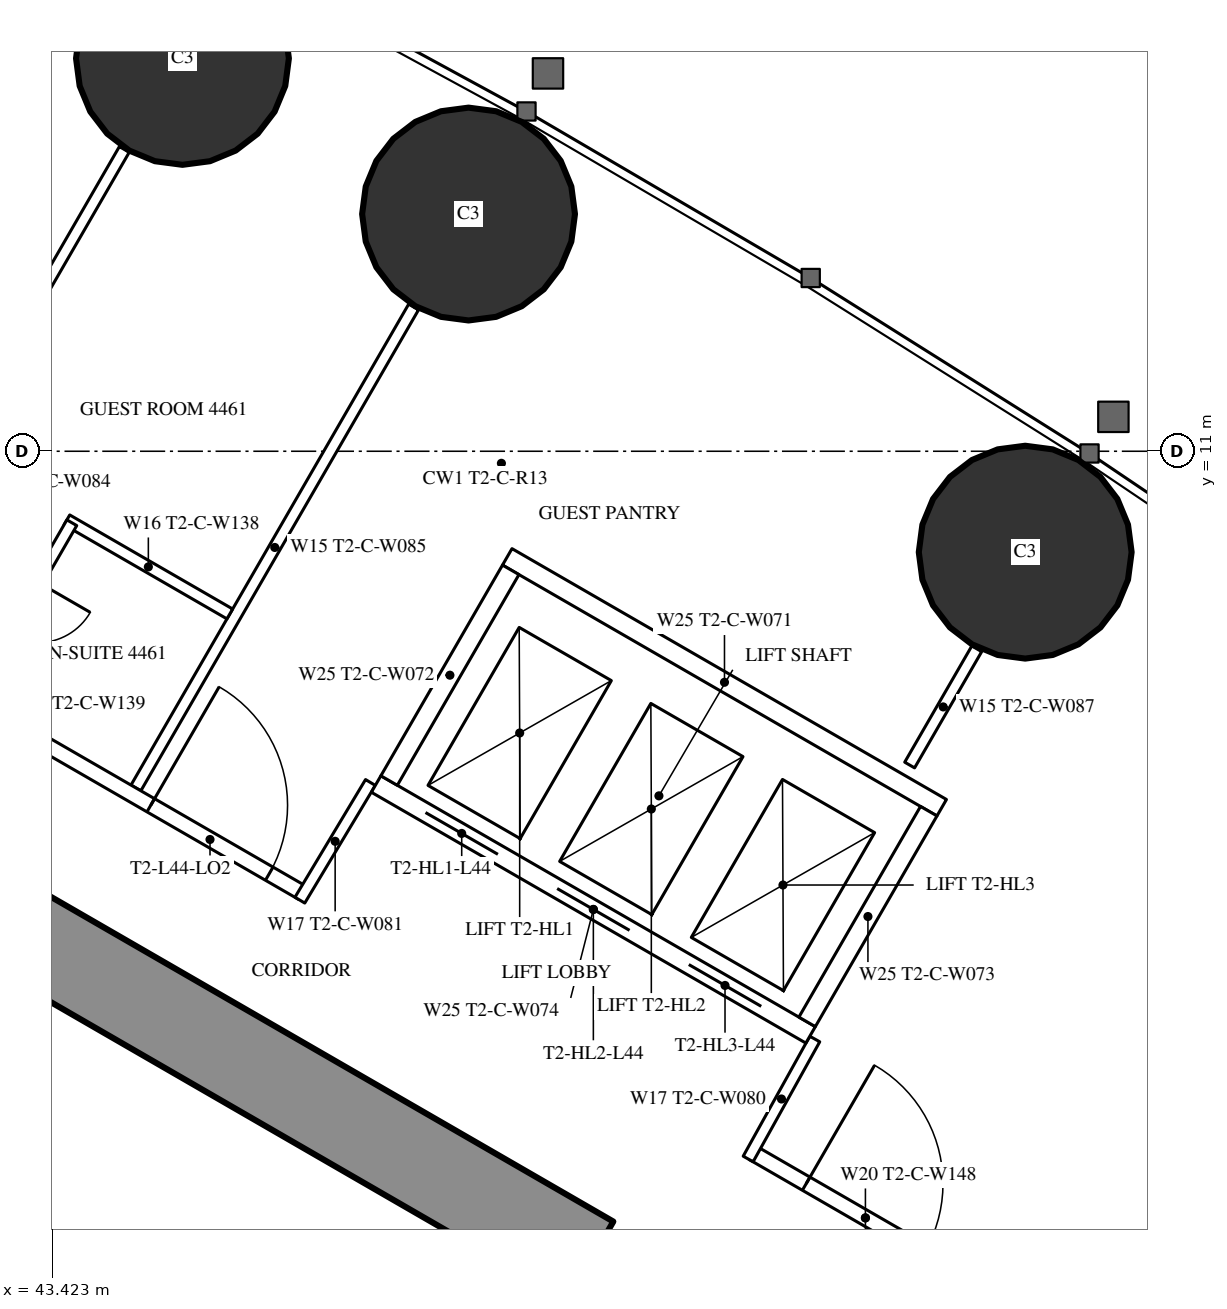
"""IFC4 building model, lengths in metres.
Left out: names, types, materials, properties, quantities, classifications, styles, units other than length and angle.
Written with IfcOpenShell. Run it as: python <this file> out.ifc"""

import sys

from ifc_helpers import new_model, si_unit, direction, frame, frame_2d, origin, origin_2d, place, context, subcontext, project, spatial, rectangle, circle, extrude, element, fill, save


model = new_model("IFC4")
c1 = context("Model", 3, precision=1e-05, world=origin(), true_north=direction((0.0, 1.0)))
c2 = subcontext(c1, "Body", "Model", "MODEL_VIEW")
j1 = project(units=[si_unit("LENGTHUNIT", "METRE"), si_unit("PLANEANGLEUNIT", "RADIAN")], contexts=[c1])
p1 = place(None, origin())
s1 = spatial("IfcSite", under=j1, at=p1, CompositionType="ELEMENT")
p2 = place(p1, origin())
s2 = spatial("IfcBuilding", under=s1, at=p2, CompositionType="ELEMENT")
p3 = place(p2, frame((0.0, 0.0, 166.8)))
s3 = spatial("IfcBuildingStorey", under=s2, at=p3, CompositionType="ELEMENT", Elevation=166.8)
for number, where, z_axis, x_axis in (
    (1, (56.221, 9.672, 0.0), (0.0, 0.0, 1.0), (1.0, 0.0, 0.0)),
    (2, (48.897, 14.121, 0.0), (0.0, 0.0, 1.0), (1.0, 0.0, 0.0)),
    (3, (45.134, 16.168, 0.0), (0.0, 0.0, 1.0), (1.0, 0.0, 0.0)),
):
    element("IfcColumn", number, at=place(p3, frame(where, z_axis=z_axis, x_axis=x_axis)), inside=s3, PredefinedType="COLUMN", context=c2, shape_type="SweptSolid", body=[
        extrude(circle(Radius=1.4, at=origin_2d()), origin(), (0.0, 0.0, 1.0), 3.5),
    ])
p4 = place(p3, frame((27.2, 13.8, 0.0), z_axis=(0.0, 0.0, 1.0), x_axis=(0.866024515034, -0.500001539357, 0.0)))
e4 = element("IfcWall", 4, at=p4, inside=s3, PredefinedType="SHEAR", context=c2, shape_type="SweptSolid", body=[
    extrude(rectangle(XDim=26.907, YDim=1.2, at=frame_2d((13.454, 0.0))), origin(), (0.0, 0.0, 1.0), 3.5),
])
p5 = place(p4, frame((4.6, 0.0, 0.0)))
e5 = element("IfcOpeningElement", 5, at=p5, cuts=e4, PredefinedType="OPENING", context=c2, shape_type="SweptSolid", body=[
    extrude(rectangle(XDim=1.0, YDim=2.2, at=frame_2d((0.5, 1.1))), frame((0.0, 0.61, 0.0), z_axis=(0.0, -1.0, 0.0), x_axis=(1.0, 0.0, 0.0)), (0.0, 0.0, 1.0), 1.22),
])
p6 = place(p4, frame((13.395, 0.0, 0.0)))
e6 = element("IfcOpeningElement", 6, at=p6, cuts=e4, PredefinedType="OPENING", context=c2, shape_type="SweptSolid", body=[
    extrude(rectangle(XDim=1.8, YDim=2.2, at=frame_2d((0.9, 1.1))), frame((0.0, 0.61, 0.0), z_axis=(0.0, -1.0, 0.0), x_axis=(1.0, 0.0, 0.0)), (0.0, 0.0, 1.0), 1.22),
])
p7 = place(p3, frame((40.769, 8.737, 0.0), z_axis=(0.0, 0.0, 1.0), x_axis=(0.500013115284, 0.866017831539, 0.0)))
e7 = element("IfcWall", 7, at=p7, inside=s3, PredefinedType="PARTITIONING", context=c2, shape_type="SweptSolid", body=[
    extrude(rectangle(XDim=7.198, YDim=0.15, at=frame_2d((3.599, 0.0))), origin(), (0.0, 0.0, 1.0), 2.3),
])
p8 = place(p3, frame((44.521, 6.571, 0.0), z_axis=(0.0, 0.0, 1.0), x_axis=(0.500020376429, 0.866013639128, 0.0)))
e8 = element("IfcWall", 8, at=p8, inside=s3, PredefinedType="PARTITIONING", context=c2, shape_type="SweptSolid", body=[
    extrude(rectangle(XDim=7.306, YDim=0.15, at=frame_2d((3.653, 0.0))), origin(), (0.0, 0.0, 1.0), 2.3),
])
p9 = place(p3, frame((54.7, 6.872, 0.0), z_axis=(0.0, 0.0, 1.0), x_axis=(0.499989690894, 0.866031355668, 0.0)))
e9 = element("IfcWall", 9, at=p9, inside=s3, PredefinedType="PARTITIONING", context=c2, shape_type="SweptSolid", body=[
    extrude(rectangle(XDim=1.766, YDim=0.15, at=frame_2d((0.883, 0.0))), origin(), (0.0, 0.0, 1.0), 3.25),
])
p10 = place(p3, frame((27.959, 16.017, 0.0), z_axis=(0.0, 0.0, 1.0), x_axis=(0.866027146794, -0.499996981007, 0.0)))
e10 = element("IfcWall", 10, at=p10, inside=s3, PredefinedType="PARTITIONING", context=c2, shape_type="SweptSolid", body=[
    extrude(rectangle(XDim=21.657, YDim=0.2, at=frame_2d((10.829, 0.0))), origin(), (0.0, 0.0, 1.0), 3.25),
])
p11 = place(p10, frame((15.391, 0.0, 0.0)))
e11 = element("IfcOpeningElement", 11, at=p11, cuts=e10, PredefinedType="OPENING", context=c2, shape_type="SweptSolid", body=[
    extrude(rectangle(XDim=0.95, YDim=2.2, at=frame_2d((0.475, 1.1))), frame((0.0, 0.11, 0.0), z_axis=(0.0, -1.0, 0.0), x_axis=(1.0, 0.0, 0.0)), (0.0, 0.0, 1.0), 0.22),
])
p12 = place(p10, frame((13.409, 0.0, 0.0)))
e12 = element("IfcOpeningElement", 12, at=p12, cuts=e10, PredefinedType="OPENING", context=c2, shape_type="SweptSolid", body=[
    extrude(rectangle(XDim=0.95, YDim=2.2, at=frame_2d((0.475, 1.1))), frame((0.0, 0.11, 0.0), z_axis=(0.0, -1.0, 0.0), x_axis=(1.0, 0.0, 0.0)), (0.0, 0.0, 1.0), 0.22),
])
p13 = place(p10, frame((0.6, 0.0, 0.0)))
e13 = element("IfcOpeningElement", 13, at=p13, cuts=e10, PredefinedType="OPENING", context=c2, shape_type="SweptSolid", body=[
    extrude(rectangle(XDim=0.95, YDim=2.2, at=frame_2d((0.475, 1.1))), frame((0.0, 0.11, 0.0), z_axis=(0.0, -1.0, 0.0), x_axis=(1.0, 0.0, 0.0)), (0.0, 0.0, 1.0), 0.22),
])
p14 = place(p10, frame((19.349, 0.0, 0.0)))
e14 = element("IfcOpeningElement", 14, at=p14, cuts=e10, PredefinedType="OPENING", context=c2, shape_type="SweptSolid", body=[
    extrude(rectangle(XDim=1.8, YDim=2.2, at=frame_2d((0.9, 1.1))), frame((0.0, 0.11, 0.0), z_axis=(0.0, -1.0, 0.0), x_axis=(1.0, 0.0, 0.0)), (0.0, 0.0, 1.0), 0.22),
])
p15 = place(p3, frame((52.639, 1.769, 0.0), z_axis=(0.0, 0.0, 1.0), x_axis=(0.866027340901, -0.4999966448, 0.0)))
e15 = element("IfcWall", 15, at=p15, inside=s3, PredefinedType="PARTITIONING", context=c2, shape_type="SweptSolid", body=[
    extrude(rectangle(XDim=3.417, YDim=0.2, at=frame_2d((1.708, 0.0))), origin(), (0.0, 0.0, 1.0), 3.25),
])
p16 = place(p15, frame((0.809, 0.0, 0.0)))
e16 = element("IfcOpeningElement", 16, at=p16, cuts=e15, PredefinedType="OPENING", context=c2, shape_type="SweptSolid", body=[
    extrude(rectangle(XDim=1.8, YDim=2.2, at=frame_2d((0.9, 1.1))), frame((0.0, 0.11, 0.0), z_axis=(0.0, -1.0, 0.0), x_axis=(1.0, 0.0, 0.0)), (0.0, 0.0, 1.0), 0.22),
])
p17 = place(p3, frame((52.576, 1.689, 0.0), z_axis=(0.0, 0.0, 1.0), x_axis=(0.485424724123, 0.874278466629, 0.0)))
e17 = element("IfcWall", 17, at=p17, inside=s3, PredefinedType="PARTITIONING", context=c2, shape_type="SweptSolid", body=[
    extrude(rectangle(XDim=1.805, YDim=0.15, at=frame_2d((0.903, 0.0))), origin(), (0.0, 0.0, 1.0), 3.25),
])
p18 = place(p3, frame((47.606, 6.643, 0.0), z_axis=(0.0, 0.0, 1.0), x_axis=(-0.514237157483, -0.857648031458, 0.0)))
e18 = element("IfcWall", 18, at=p18, inside=s3, PredefinedType="PARTITIONING", context=c2, shape_type="SweptSolid", body=[
    extrude(rectangle(XDim=1.805, YDim=0.15, at=frame_2d((0.902, 0.0))), origin(), (0.0, 0.0, 1.0), 3.25),
])
p19 = place(p3, frame((43.613, 10.097, 0.0), z_axis=(0.0, 0.0, 1.0), x_axis=(0.866031185235, -0.4999899861, 0.0)))
e19 = element("IfcWall", 19, at=p19, inside=s3, PredefinedType="PARTITIONING", context=c2, shape_type="SweptSolid", body=[
    extrude(rectangle(XDim=2.475, YDim=0.15, at=frame_2d((1.238, 0.0))), origin(), (0.0, 0.0, 1.0), 3.25),
])
p20 = place(p3, frame((42.378, 7.808, 0.0), z_axis=(0.0, 0.0, 1.0), x_axis=(0.500006934395, 0.866021400173, 0.0)))
e20 = element("IfcWall", 20, at=p20, inside=s3, PredefinedType="PARTITIONING", context=c2, shape_type="SweptSolid", body=[
    extrude(rectangle(XDim=2.6, YDim=0.15, at=frame_2d((1.3, 0.0))), origin(), (0.0, 0.0, 1.0), 3.25),
])
p21 = place(p20, frame((0.9, 0.0, 0.0)))
e21 = element("IfcOpeningElement", 21, at=p21, cuts=e20, PredefinedType="OPENING", context=c2, shape_type="SweptSolid", body=[
    extrude(rectangle(XDim=0.8, YDim=2.2, at=frame_2d((0.4, 1.1))), frame((0.0, 0.085, 0.0), z_axis=(0.0, -1.0, 0.0), x_axis=(1.0, 0.0, 0.0)), (0.0, 0.0, 1.0), 0.17),
])
p22 = place(p3, frame((47.681, 6.622, 0.0), z_axis=(0.0, 0.0, 1.0), x_axis=(0.86603344179, -0.499986077507, 0.0)))
e22 = element("IfcWall", 22, at=p22, inside=s3, PredefinedType="PARTITIONING", context=c2, shape_type="SweptSolid", body=[
    extrude(rectangle(XDim=6.6, YDim=0.25, at=frame_2d((3.3, 0.0))), origin(), (0.0, 0.0, 1.0), 3.25),
])
p23 = place(p22, frame((0.75, 0.0, 0.0)))
e23 = element("IfcOpeningElement", 23, at=p23, cuts=e22, PredefinedType="OPENING", context=c2, shape_type="SweptSolid", body=[
    extrude(rectangle(XDim=1.1, YDim=2.2, at=frame_2d((0.55, 1.1))), frame((0.0, 0.135, 0.0), z_axis=(0.0, -1.0, 0.0), x_axis=(1.0, 0.0, 0.0)), (0.0, 0.0, 1.0), 0.27),
])
p24 = place(p22, frame((2.75, 0.0, 0.0)))
e24 = element("IfcOpeningElement", 24, at=p24, cuts=e22, PredefinedType="OPENING", context=c2, shape_type="SweptSolid", body=[
    extrude(rectangle(XDim=1.1, YDim=2.2, at=frame_2d((0.55, 1.1))), frame((0.0, 0.135, 0.0), z_axis=(0.0, -1.0, 0.0), x_axis=(1.0, 0.0, 0.0)), (0.0, 0.0, 1.0), 0.27),
])
p25 = place(p22, frame((4.75, 0.0, 0.0)))
e25 = element("IfcOpeningElement", 25, at=p25, cuts=e22, PredefinedType="OPENING", context=c2, shape_type="SweptSolid", body=[
    extrude(rectangle(XDim=1.1, YDim=2.2, at=frame_2d((0.55, 1.1))), frame((0.0, 0.135, 0.0), z_axis=(0.0, -1.0, 0.0), x_axis=(1.0, 0.0, 0.0)), (0.0, 0.0, 1.0), 0.27),
])
p26 = place(p3, frame((49.406, 9.611, 0.0), z_axis=(0.0, 0.0, 1.0), x_axis=(0.86603344179, -0.499986077507, 0.0)))
e26 = element("IfcWall", 26, at=p26, inside=s3, PredefinedType="PARTITIONING", context=c2, shape_type="SweptSolid", body=[
    extrude(rectangle(XDim=6.6, YDim=0.25, at=frame_2d((3.3, 0.0))), origin(), (0.0, 0.0, 1.0), 3.25),
])
p27 = place(p3, frame((47.852, 6.668, 0.0), z_axis=(0.0, 0.0, 1.0), x_axis=(0.499929347863, 0.866066190972, 0.0)))
e27 = element("IfcWall", 27, at=p27, inside=s3, PredefinedType="PARTITIONING", context=c2, shape_type="SweptSolid", body=[
    extrude(rectangle(XDim=3.201, YDim=0.25, at=frame_2d((1.6, 0.0))), origin(), (0.0, 0.0, 1.0), 3.25),
])
p28 = place(p3, frame((53.352, 3.493, 0.0), z_axis=(0.0, 0.0, 1.0), x_axis=(0.499872130319, 0.866099216793, 0.0)))
e28 = element("IfcWall", 28, at=p28, inside=s3, PredefinedType="PARTITIONING", context=c2, shape_type="SweptSolid", body=[
    extrude(rectangle(XDim=3.2, YDim=0.25, at=frame_2d((1.6, 0.0))), origin(), (0.0, 0.0, 1.0), 3.25),
])
p29 = place(p16, origin())
e29 = element("IfcDoor", 29, at=p29, inside=s3, OperationType="DOUBLE_DOOR_SINGLE_SWING", PredefinedType="DOOR", context=c2, shape_type="SweptSolid", body=[
    extrude(rectangle(XDim=1.8, YDim=2.2, at=frame_2d((0.9, 1.1))), frame((0.0, 0.025, 0.0), z_axis=(0.0, -1.0, 0.0), x_axis=(1.0, 0.0, 0.0)), (0.0, 0.0, 1.0), 0.05),
])
fill(e16, e29)
p30 = place(p14, origin())
e30 = element("IfcDoor", 30, at=p30, inside=s3, OperationType="DOUBLE_DOOR_SINGLE_SWING", PredefinedType="DOOR", context=c2, shape_type="SweptSolid", body=[
    extrude(rectangle(XDim=1.8, YDim=2.2, at=frame_2d((0.9, 1.1))), frame((0.0, 0.025, 0.0), z_axis=(0.0, -1.0, 0.0), x_axis=(1.0, 0.0, 0.0)), (0.0, 0.0, 1.0), 0.05),
])
fill(e14, e30)
p31 = place(p23, origin())
e31 = element("IfcDoor", 31, at=p31, inside=s3, OperationType="DOUBLE_DOOR_SLIDING", PredefinedType="USERDEFINED", context=c2, shape_type="SweptSolid", body=[
    extrude(rectangle(XDim=1.1, YDim=2.2, at=frame_2d((0.55, 1.1))), frame((0.0, 0.025, 0.0), z_axis=(0.0, -1.0, 0.0), x_axis=(1.0, 0.0, 0.0)), (0.0, 0.0, 1.0), 0.05),
])
fill(e23, e31)
p32 = place(p24, origin())
e32 = element("IfcDoor", 32, at=p32, inside=s3, OperationType="DOUBLE_DOOR_SLIDING", PredefinedType="USERDEFINED", context=c2, shape_type="SweptSolid", body=[
    extrude(rectangle(XDim=1.1, YDim=2.2, at=frame_2d((0.55, 1.1))), frame((0.0, 0.025, 0.0), z_axis=(0.0, -1.0, 0.0), x_axis=(1.0, 0.0, 0.0)), (0.0, 0.0, 1.0), 0.05),
])
fill(e24, e32)
p33 = place(p25, origin())
e33 = element("IfcDoor", 33, at=p33, inside=s3, OperationType="DOUBLE_DOOR_SLIDING", PredefinedType="USERDEFINED", context=c2, shape_type="SweptSolid", body=[
    extrude(rectangle(XDim=1.1, YDim=2.2, at=frame_2d((0.55, 1.1))), frame((0.0, 0.025, 0.0), z_axis=(0.0, -1.0, 0.0), x_axis=(1.0, 0.0, 0.0)), (0.0, 0.0, 1.0), 0.05),
])
fill(e25, e33)
save(model, sys.argv[1])
